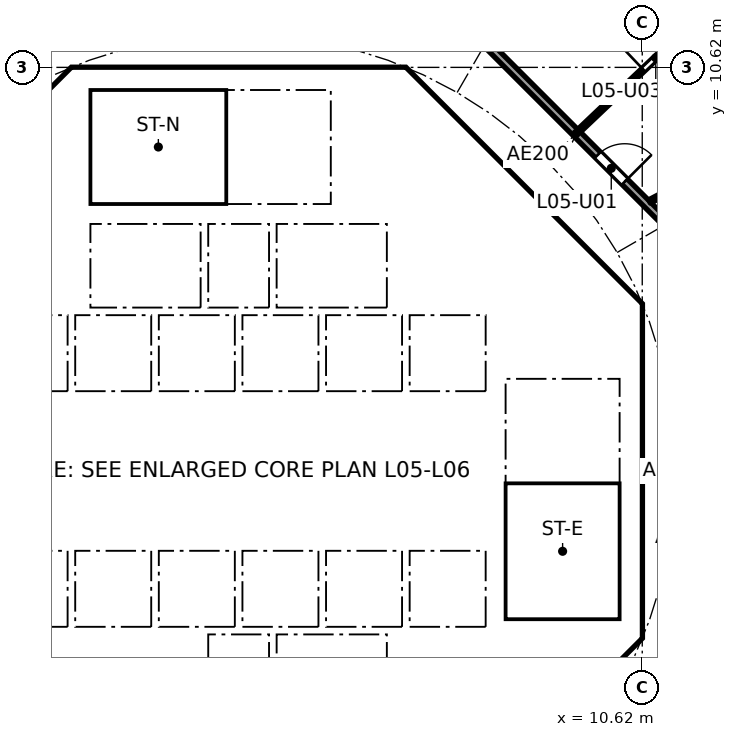
"""IFC4 building model, lengths in metres.
Left out: names, types, materials, properties, quantities, classifications, styles, units other than length and angle.
Written with IfcOpenShell. Run it as: python <this file> out.ifc"""

import sys

from ifc_helpers import new_model, si_unit, direction, frame, frame_2d, origin, place, context, subcontext, project, spatial, polyline, rectangle, outline, extrude, element, fill, save


model = new_model("IFC4")
c1 = context("Model", 3, precision=1e-05, world=origin(), true_north=direction((0.0, 1.0)))
c2 = subcontext(c1, "Body", "Model", "MODEL_VIEW")
j1 = project(units=[si_unit("LENGTHUNIT", "METRE"), si_unit("PLANEANGLEUNIT", "RADIAN")], contexts=[c1])
p1 = place(None, origin())
s1 = spatial("IfcSite", under=j1, at=p1, CompositionType="ELEMENT")
p2 = place(p1, origin())
s2 = spatial("IfcBuilding", under=s1, at=p2, CompositionType="ELEMENT")
p3 = place(p2, frame((0.0, 0.0, 27.0)))
s3 = spatial("IfcBuildingStorey", under=s2, at=p3, CompositionType="ELEMENT", Elevation=27.0)
p4 = place(p3, frame((9.988, 4.613, 0.0), z_axis=(0.0, 0.0, 1.0), x_axis=(-0.707106781187, 0.707106781187, 0.0)))
e1 = element("IfcWall", 1, at=p4, inside=s3, PredefinedType="SHEAR", context=c2, shape_type="SweptSolid", body=[
    extrude(rectangle(XDim=7.602, YDim=0.6, at=frame_2d((3.801, 0.0))), origin(), (0.0, 0.0, 1.0), 3.44),
])
p5 = place(p4, frame((3.201, 0.0, 0.0)))
e2 = element("IfcOpeningElement", 2, at=p5, cuts=e1, PredefinedType="OPENING", context=c2, shape_type="SweptSolid", body=[
    extrude(rectangle(XDim=1.2, YDim=2.1, at=frame_2d((0.6, 1.05))), frame((0.0, 0.31, 0.0), z_axis=(0.0, -1.0, 0.0), x_axis=(1.0, 0.0, 0.0)), (0.0, 0.0, 1.0), 0.62),
])
p6 = place(p3, frame((-4.613, 9.988, 0.0), z_axis=(0.0, 0.0, 1.0), x_axis=(-0.707106781187, -0.707106781187, 0.0)))
e3 = element("IfcWall", 3, at=p6, inside=s3, PredefinedType="SHEAR", context=c2, shape_type="SweptSolid", body=[
    extrude(rectangle(XDim=7.602, YDim=0.6, at=frame_2d((3.801, 0.0))), origin(), (0.0, 0.0, 1.0), 3.44),
])
p7 = place(p6, frame((0.351, 0.0, 0.0)))
e4 = element("IfcOpeningElement", 4, at=p7, cuts=e3, PredefinedType="OPENING", context=c2, shape_type="SweptSolid", body=[
    extrude(rectangle(XDim=1.1, YDim=2.1, at=frame_2d((0.55, 1.05))), frame((0.0, 0.31, 0.0), z_axis=(0.0, -1.0, 0.0), x_axis=(1.0, 0.0, 0.0)), (0.0, 0.0, 1.0), 0.62),
])
p8 = place(p3, frame((-9.988, -4.613, 0.0), z_axis=(0.0, 0.0, 1.0), x_axis=(0.707106781187, -0.707106781187, 0.0)))
e5 = element("IfcWall", 5, at=p8, inside=s3, PredefinedType="SHEAR", context=c2, shape_type="SweptSolid", body=[
    extrude(rectangle(XDim=7.602, YDim=0.6, at=frame_2d((3.801, 0.0))), origin(), (0.0, 0.0, 1.0), 3.44),
])
p9 = place(p8, frame((6.151, 0.0, 0.0)))
e6 = element("IfcOpeningElement", 6, at=p9, cuts=e5, PredefinedType="OPENING", context=c2, shape_type="SweptSolid", body=[
    extrude(rectangle(XDim=1.1, YDim=2.1, at=frame_2d((0.55, 1.05))), frame((0.0, 0.31, 0.0), z_axis=(0.0, -1.0, 0.0), x_axis=(1.0, 0.0, 0.0)), (0.0, 0.0, 1.0), 0.62),
])
p10 = place(p3, frame((4.613, -9.988, 0.0), z_axis=(0.0, 0.0, 1.0), x_axis=(0.707106781187, 0.707106781187, 0.0)))
e7 = element("IfcWall", 7, at=p10, inside=s3, PredefinedType="SHEAR", context=c2, shape_type="SweptSolid", body=[
    extrude(rectangle(XDim=7.602, YDim=0.6, at=frame_2d((3.801, 0.0))), origin(), (0.0, 0.0, 1.0), 3.44),
])
p11 = place(p10, frame((3.201, 0.0, 0.0)))
e8 = element("IfcOpeningElement", 8, at=p11, cuts=e7, PredefinedType="OPENING", context=c2, shape_type="SweptSolid", body=[
    extrude(rectangle(XDim=1.2, YDim=2.1, at=frame_2d((0.6, 1.05))), frame((0.0, 0.31, 0.0), z_axis=(0.0, -1.0, 0.0), x_axis=(1.0, 0.0, 0.0)), (0.0, 0.0, 1.0), 0.62),
])
p12 = place(p3, frame((4.0, 4.3, 0.0), z_axis=(0.0, 0.0, 1.0), x_axis=(0.0, 1.0, 0.0)))
e9 = element("IfcWall", 9, at=p12, inside=s3, PredefinedType="SOLIDWALL", context=c2, shape_type="SweptSolid", body=[
    extrude(rectangle(XDim=2.2, YDim=0.2, at=frame_2d((1.1, 0.0))), origin(), (0.0, 0.0, 1.0), 3.44),
])
p13 = place(p12, frame((0.55, 0.0, 0.0)))
e10 = element("IfcOpeningElement", 10, at=p13, cuts=e9, PredefinedType="OPENING", context=c2, shape_type="SweptSolid", body=[
    extrude(rectangle(XDim=1.1, YDim=2.1, at=frame_2d((0.55, 1.05))), frame((0.0, 0.11, 0.0), z_axis=(0.0, -1.0, 0.0), x_axis=(1.0, 0.0, 0.0)), (0.0, 0.0, 1.0), 0.22),
])
p14 = place(p3, frame((-4.0, 4.3, 0.0), z_axis=(0.0, 0.0, 1.0), x_axis=(0.0, 1.0, 0.0)))
e11 = element("IfcWall", 11, at=p14, inside=s3, PredefinedType="SOLIDWALL", context=c2, shape_type="SweptSolid", body=[
    extrude(rectangle(XDim=2.2, YDim=0.2, at=frame_2d((1.1, 0.0))), origin(), (0.0, 0.0, 1.0), 3.44),
])
p15 = place(p14, frame((0.55, 0.0, 0.0)))
e12 = element("IfcOpeningElement", 12, at=p15, cuts=e11, PredefinedType="OPENING", context=c2, shape_type="SweptSolid", body=[
    extrude(rectangle(XDim=1.1, YDim=2.1, at=frame_2d((0.55, 1.05))), frame((0.0, 0.11, 0.0), z_axis=(0.0, -1.0, 0.0), x_axis=(1.0, 0.0, 0.0)), (0.0, 0.0, 1.0), 0.22),
])
p16 = place(p3, frame((-6.7, 2.0, 0.0), z_axis=(0.0, 0.0, 1.0), x_axis=(1.0, 0.0, 0.0)))
e13 = element("IfcWall", 13, at=p16, inside=s3, PredefinedType="SOLIDWALL", context=c2, shape_type="SweptSolid", body=[
    extrude(rectangle(XDim=13.4, YDim=0.2, at=frame_2d((6.7, 0.0))), origin(), (0.0, 0.0, 1.0), 3.44),
])
p17 = place(p16, frame((0.65, 0.0, 0.0)))
e14 = element("IfcOpeningElement", 14, at=p17, cuts=e13, PredefinedType="OPENING", context=c2, shape_type="SweptSolid", body=[
    extrude(rectangle(XDim=1.1, YDim=2.1, at=frame_2d((0.55, 1.05))), frame((0.0, 0.11, 0.0), z_axis=(0.0, -1.0, 0.0), x_axis=(1.0, 0.0, 0.0)), (0.0, 0.0, 1.0), 0.22),
])
p18 = place(p16, frame((2.85, 0.0, 0.0)))
e15 = element("IfcOpeningElement", 15, at=p18, cuts=e13, PredefinedType="OPENING", context=c2, shape_type="SweptSolid", body=[
    extrude(rectangle(XDim=1.1, YDim=2.1, at=frame_2d((0.55, 1.05))), frame((0.0, 0.11, 0.0), z_axis=(0.0, -1.0, 0.0), x_axis=(1.0, 0.0, 0.0)), (0.0, 0.0, 1.0), 0.22),
])
p19 = place(p16, frame((5.05, 0.0, 0.0)))
e16 = element("IfcOpeningElement", 16, at=p19, cuts=e13, PredefinedType="OPENING", context=c2, shape_type="SweptSolid", body=[
    extrude(rectangle(XDim=1.1, YDim=2.1, at=frame_2d((0.55, 1.05))), frame((0.0, 0.11, 0.0), z_axis=(0.0, -1.0, 0.0), x_axis=(1.0, 0.0, 0.0)), (0.0, 0.0, 1.0), 0.22),
])
p20 = place(p3, frame((6.7, 4.0, 0.0), z_axis=(0.0, 0.0, 1.0), x_axis=(1.0, 0.0, 0.0)))
e17 = element("IfcWall", 17, at=p20, inside=s3, PredefinedType="SOLIDWALL", context=c2, shape_type="SweptSolid", body=[
    extrude(rectangle(XDim=3.325, YDim=0.2, at=frame_2d((1.662, 0.0))), origin(), (0.0, 0.0, 1.0), 3.44),
])
p21 = place(p20, frame((1.25, 0.0, 0.0)))
e18 = element("IfcOpeningElement", 18, at=p21, cuts=e17, PredefinedType="OPENING", context=c2, shape_type="SweptSolid", body=[
    extrude(rectangle(XDim=1.1, YDim=2.1, at=frame_2d((0.55, 1.05))), frame((0.0, 0.11, 0.0), z_axis=(0.0, -1.0, 0.0), x_axis=(1.0, 0.0, 0.0)), (0.0, 0.0, 1.0), 0.22),
])
p22 = place(p3, frame((4.0, 7.025, 0.0), z_axis=(0.0, 0.0, 1.0), x_axis=(0.0, 1.0, 0.0)))
e19 = element("IfcWall", 19, at=p22, inside=s3, PredefinedType="SOLIDWALL", context=c2, shape_type="SweptSolid", body=[
    extrude(rectangle(XDim=3.0, YDim=0.2, at=frame_2d((1.5, 0.0))), origin(), (0.0, 0.0, 1.0), 3.44),
])
p23 = place(p22, frame((0.925, 0.0, 0.0)))
e20 = element("IfcOpeningElement", 20, at=p23, cuts=e19, PredefinedType="OPENING", context=c2, shape_type="SweptSolid", body=[
    extrude(rectangle(XDim=1.1, YDim=2.1, at=frame_2d((0.55, 1.05))), frame((0.0, 0.11, 0.0), z_axis=(0.0, -1.0, 0.0), x_axis=(1.0, 0.0, 0.0)), (0.0, 0.0, 1.0), 0.22),
])
p24 = place(p3, frame((4.0, -6.5, 0.0), z_axis=(0.0, 0.0, 1.0), x_axis=(0.0, 1.0, 0.0)))
e21 = element("IfcWall", 21, at=p24, inside=s3, PredefinedType="SOLIDWALL", context=c2, shape_type="SweptSolid", body=[
    extrude(rectangle(XDim=2.2, YDim=0.2, at=frame_2d((1.1, 0.0))), origin(), (0.0, 0.0, 1.0), 3.44),
])
p25 = place(p24, frame((0.55, 0.0, 0.0)))
e22 = element("IfcOpeningElement", 22, at=p25, cuts=e21, PredefinedType="OPENING", context=c2, shape_type="SweptSolid", body=[
    extrude(rectangle(XDim=1.1, YDim=2.1, at=frame_2d((0.55, 1.05))), frame((0.0, 0.11, 0.0), z_axis=(0.0, -1.0, 0.0), x_axis=(1.0, 0.0, 0.0)), (0.0, 0.0, 1.0), 0.22),
])
p26 = place(p3, frame((-4.0, -6.5, 0.0), z_axis=(0.0, 0.0, 1.0), x_axis=(0.0, 1.0, 0.0)))
e23 = element("IfcWall", 23, at=p26, inside=s3, PredefinedType="SOLIDWALL", context=c2, shape_type="SweptSolid", body=[
    extrude(rectangle(XDim=2.2, YDim=0.2, at=frame_2d((1.1, 0.0))), origin(), (0.0, 0.0, 1.0), 3.44),
])
p27 = place(p26, frame((0.65, 0.0, 0.0)))
e24 = element("IfcOpeningElement", 24, at=p27, cuts=e23, PredefinedType="OPENING", context=c2, shape_type="SweptSolid", body=[
    extrude(rectangle(XDim=0.9, YDim=2.1, at=frame_2d((0.45, 1.05))), frame((0.0, 0.11, 0.0), z_axis=(0.0, -1.0, 0.0), x_axis=(1.0, 0.0, 0.0)), (0.0, 0.0, 1.0), 0.22),
])
p28 = place(p3, frame((-6.7, -2.0, 0.0), z_axis=(0.0, 0.0, 1.0), x_axis=(1.0, 0.0, 0.0)))
e25 = element("IfcWall", 25, at=p28, inside=s3, PredefinedType="SOLIDWALL", context=c2, shape_type="SweptSolid", body=[
    extrude(rectangle(XDim=13.4, YDim=0.2, at=frame_2d((6.7, 0.0))), origin(), (0.0, 0.0, 1.0), 3.44),
])
p29 = place(p28, frame((0.65, 0.0, 0.0)))
e26 = element("IfcOpeningElement", 26, at=p29, cuts=e25, PredefinedType="OPENING", context=c2, shape_type="SweptSolid", body=[
    extrude(rectangle(XDim=1.1, YDim=2.1, at=frame_2d((0.55, 1.05))), frame((0.0, 0.11, 0.0), z_axis=(0.0, -1.0, 0.0), x_axis=(1.0, 0.0, 0.0)), (0.0, 0.0, 1.0), 0.22),
])
p30 = place(p28, frame((2.85, 0.0, 0.0)))
e27 = element("IfcOpeningElement", 27, at=p30, cuts=e25, PredefinedType="OPENING", context=c2, shape_type="SweptSolid", body=[
    extrude(rectangle(XDim=1.1, YDim=2.1, at=frame_2d((0.55, 1.05))), frame((0.0, 0.11, 0.0), z_axis=(0.0, -1.0, 0.0), x_axis=(1.0, 0.0, 0.0)), (0.0, 0.0, 1.0), 0.22),
])
p31 = place(p3, origin())
e28 = element("IfcWall", 28, at=p31, inside=s3, PredefinedType="SHEAR", context=c2, shape_type="SweptSolid", body=[
    extrude(outline(polyline([(-4.152, 10.025), (-4.401, 9.776), (-4.825, 10.2), (-4.401, 10.625), (4.401, 10.625), (4.825, 10.2), (4.401, 9.776), (4.152, 10.025), (-4.152, 10.025)])), origin(), (0.0, 0.0, 1.0), 3.44),
])
p32 = place(p3, origin())
e29 = element("IfcWall", 29, at=p32, inside=s3, PredefinedType="SHEAR", context=c2, shape_type="SweptSolid", body=[
    extrude(outline(polyline([(9.776, -4.401), (10.025, -4.152), (10.025, -3.801), (10.025, 4.152), (9.776, 4.401), (10.2, 4.825), (10.625, 4.401), (10.625, -4.401), (10.2, -4.825), (9.776, -4.401)])), origin(), (0.0, 0.0, 1.0), 3.44),
])
for number, where, z_axis, x_axis in (
    (30, (-0.9, -6.5, 0.0), (0.0, 0.0, 1.0), (0.0, 1.0, 0.0)),
    (31, (0.9, -6.5, 0.0), (0.0, 0.0, 1.0), (0.0, 1.0, 0.0)),
):
    element("IfcWall", number, at=place(p3, frame(where, z_axis=z_axis, x_axis=x_axis)), inside=s3, PredefinedType="SOLIDWALL", context=c2, shape_type="SweptSolid", body=[
        extrude(rectangle(XDim=2.2, YDim=0.2, at=frame_2d((1.1, 0.0))), origin(), (0.0, 0.0, 1.0), 3.44),
    ])
p33 = place(p3, origin())
e32 = element("IfcWall", 32, at=p33, inside=s3, PredefinedType="SOLIDWALL", context=c2, shape_type="SweptSolid", body=[
    extrude(outline(polyline([(-6.7, -2.1), (-6.5, -2.1), (-6.5, -4.1), (-4.5, -4.1), (-4.5, -2.1), (-4.3, -2.1), (-4.3, -4.1), (-2.3, -4.1), (-2.3, -2.1), (-2.1, -2.1), (-2.1, -4.1), (-0.1, -4.1), (-0.1, -2.1), (0.1, -2.1), (0.1, -4.1), (2.1, -4.1), (2.1, -2.1), (2.3, -2.1), (2.3, -4.1), (4.3, -4.1), (4.3, -2.1), (4.5, -2.1), (4.5, -4.1), (6.5, -4.1), (6.5, -2.1), (6.7, -2.1), (6.7, -4.3), (-6.7, -4.3), (-6.7, -2.1)])), origin(), (0.0, 0.0, 1.0), 3.44),
])
for number, where, z_axis, x_axis in (
    (33, (-0.9, 4.3, 0.0), (0.0, 0.0, 1.0), (0.0, 1.0, 0.0)),
    (34, (0.9, 4.3, 0.0), (0.0, 0.0, 1.0), (0.0, 1.0, 0.0)),
):
    element("IfcWall", number, at=place(p3, frame(where, z_axis=z_axis, x_axis=x_axis)), inside=s3, PredefinedType="SOLIDWALL", context=c2, shape_type="SweptSolid", body=[
        extrude(rectangle(XDim=2.2, YDim=0.2, at=frame_2d((1.1, 0.0))), origin(), (0.0, 0.0, 1.0), 3.44),
    ])
p34 = place(p3, origin())
e35 = element("IfcWall", 35, at=p34, inside=s3, PredefinedType="SOLIDWALL", context=c2, shape_type="SweptSolid", body=[
    extrude(outline(polyline([(-6.5, 2.1), (-6.7, 2.1), (-6.7, 4.3), (6.7, 4.3), (6.7, 2.1), (6.5, 2.1), (6.5, 4.1), (4.5, 4.1), (4.5, 2.1), (4.3, 2.1), (4.3, 4.1), (2.3, 4.1), (2.3, 2.1), (2.1, 2.1), (2.1, 4.1), (0.1, 4.1), (0.1, 2.1), (-0.1, 2.1), (-0.1, 4.1), (-2.1, 4.1), (-2.1, 2.1), (-2.3, 2.1), (-2.3, 4.1), (-4.3, 4.1), (-4.3, 2.1), (-4.5, 2.1), (-4.5, 4.1), (-6.5, 4.1), (-6.5, 2.1)])), origin(), (0.0, 0.0, 1.0), 3.44),
])
p35 = place(p3, origin())
e36 = element("IfcWall", 36, at=p35, inside=s3, PredefinedType="SOLIDWALL", context=c2, shape_type="SweptSolid", body=[
    extrude(outline(polyline([(-3.9, 7.025), (-4.1, 7.025), (-4.1, 10.025), (-3.9, 10.025), (-3.9, 7.025)])), origin(), (0.0, 0.0, 1.0), 3.44),
])
p36 = place(p3, origin())
e37 = element("IfcWall", 37, at=p36, inside=s3, PredefinedType="SOLIDWALL", context=c2, shape_type="SweptSolid", body=[
    extrude(outline(polyline([(4.1, 6.5), (-4.1, 6.5), (-4.1, 7.025), (4.1, 7.025), (4.1, 6.5)])), origin(), (0.0, 0.0, 1.0), 3.44),
])
p37 = place(p3, origin())
e38 = element("IfcWall", 38, at=p37, inside=s3, PredefinedType="SOLIDWALL", context=c2, shape_type="SweptSolid", body=[
    extrude(outline(polyline([(7.025, -3.9), (6.7, -3.9), (6.7, 3.9), (7.025, 3.9), (7.025, -3.9)])), origin(), (0.0, 0.0, 1.0), 3.44),
])
p38 = place(p3, origin())
e39 = element("IfcWall", 39, at=p38, inside=s3, PredefinedType="SOLIDWALL", context=c2, shape_type="SweptSolid", body=[
    extrude(outline(polyline([(10.025, -4.1), (6.7, -4.1), (6.7, -3.9), (10.025, -3.9), (10.025, -4.1)])), origin(), (0.0, 0.0, 1.0), 3.44),
])
p39 = place(p3, frame((12.635, 5.134, 0.0), z_axis=(0.0, 0.0, 1.0), x_axis=(-0.707106781187, 0.707106781187, 0.0)))
e40 = element("IfcWall", 40, at=p39, inside=s3, PredefinedType="PARTITIONING", context=c2, shape_type="SweptSolid", body=[
    extrude(rectangle(XDim=10.609, YDim=0.2, at=frame_2d((5.305, 0.0))), origin(), (0.0, 0.0, 1.0), 3.44),
])
p40 = place(p39, frame((3.503, 0.0, 0.0)))
e41 = element("IfcOpeningElement", 41, at=p40, cuts=e40, PredefinedType="OPENING", context=c2, shape_type="SweptSolid", body=[
    extrude(rectangle(XDim=1.0, YDim=2.1, at=frame_2d((0.5, 1.05))), frame((0.0, 0.11, 0.0), z_axis=(0.0, -1.0, 0.0), x_axis=(1.0, 0.0, 0.0)), (0.0, 0.0, 1.0), 0.22),
])
p41 = place(p3, frame((10.813, 7.091, 0.0), z_axis=(0.0, 0.0, 1.0), x_axis=(0.885182649479, 0.465243674928, 0.0)))
e42 = element("IfcWall", 42, at=p41, inside=s3, PredefinedType="PARTITIONING", context=c2, shape_type="SweptSolid", body=[
    extrude(rectangle(XDim=12.551, YDim=0.1, at=frame_2d((6.275, 0.0))), origin(), (0.0, 0.0, 1.0), 2.687),
])
p42 = place(p41, frame((0.539, 0.0, 0.0)))
e43 = element("IfcOpeningElement", 43, at=p42, cuts=e42, PredefinedType="OPENING", context=c2, shape_type="SweptSolid", body=[
    extrude(rectangle(XDim=0.9, YDim=2.1, at=frame_2d((0.45, 1.05))), frame((0.0, 0.06, 0.0), z_axis=(0.0, -1.0, 0.0), x_axis=(1.0, 0.0, 0.0)), (0.0, 0.0, 1.0), 0.12),
])
p43 = place(p41, frame((8.494, 0.0, 0.0)))
e44 = element("IfcOpeningElement", 44, at=p43, cuts=e42, PredefinedType="OPENING", context=c2, shape_type="SweptSolid", body=[
    extrude(rectangle(XDim=0.9, YDim=2.1, at=frame_2d((0.45, 1.05))), frame((0.0, 0.06, 0.0), z_axis=(0.0, -1.0, 0.0), x_axis=(1.0, 0.0, 0.0)), (0.0, 0.0, 1.0), 0.12),
])
p44 = place(p3, frame((8.957, 8.953, 0.0), z_axis=(0.0, 0.0, 1.0), x_axis=(0.725250022034, 0.688485588476, 0.0)))
e45 = element("IfcWall", 45, at=p44, inside=s3, PredefinedType="PARTITIONING", context=c2, shape_type="SweptSolid", body=[
    extrude(rectangle(XDim=12.963, YDim=0.1, at=frame_2d((6.481, 0.0))), origin(), (0.0, 0.0, 1.0), 2.687),
])
p45 = place(p44, frame((2.333, 0.0, 0.0)))
e46 = element("IfcOpeningElement", 46, at=p45, cuts=e45, PredefinedType="OPENING", context=c2, shape_type="SweptSolid", body=[
    extrude(rectangle(XDim=0.9, YDim=2.1, at=frame_2d((0.45, 1.05))), frame((0.0, 0.06, 0.0), z_axis=(0.0, -1.0, 0.0), x_axis=(1.0, 0.0, 0.0)), (0.0, 0.0, 1.0), 0.12),
])
p46 = place(p44, frame((8.79, 0.0, 0.0)))
e47 = element("IfcOpeningElement", 47, at=p46, cuts=e45, PredefinedType="OPENING", context=c2, shape_type="SweptSolid", body=[
    extrude(rectangle(XDim=0.9, YDim=2.1, at=frame_2d((0.45, 1.05))), frame((0.0, 0.06, 0.0), z_axis=(0.0, -1.0, 0.0), x_axis=(1.0, 0.0, 0.0)), (0.0, 0.0, 1.0), 0.12),
])
p47 = place(p18, origin())
e48 = element("IfcDoor", 48, at=p47, inside=s3, OperationType="DOUBLE_DOOR_SLIDING", PredefinedType="DOOR", context=c2, shape_type="SweptSolid", body=[
    extrude(rectangle(XDim=1.1, YDim=2.1, at=frame_2d((0.55, 1.05))), frame((0.0, 0.025, 0.0), z_axis=(0.0, -1.0, 0.0), x_axis=(1.0, 0.0, 0.0)), (0.0, 0.0, 1.0), 0.05),
])
fill(e15, e48)
p48 = place(p19, origin())
e49 = element("IfcDoor", 49, at=p48, inside=s3, OperationType="DOUBLE_DOOR_SLIDING", PredefinedType="DOOR", context=c2, shape_type="SweptSolid", body=[
    extrude(rectangle(XDim=1.1, YDim=2.1, at=frame_2d((0.55, 1.05))), frame((0.0, 0.025, 0.0), z_axis=(0.0, -1.0, 0.0), x_axis=(1.0, 0.0, 0.0)), (0.0, 0.0, 1.0), 0.05),
])
fill(e16, e49)
p49 = place(p30, origin())
e50 = element("IfcDoor", 50, at=p49, inside=s3, OperationType="DOUBLE_DOOR_SLIDING", PredefinedType="DOOR", context=c2, shape_type="SweptSolid", body=[
    extrude(rectangle(XDim=1.1, YDim=2.1, at=frame_2d((0.55, 1.05))), frame((0.0, 0.025, 0.0), z_axis=(0.0, -1.0, 0.0), x_axis=(1.0, 0.0, 0.0)), (0.0, 0.0, 1.0), 0.05),
])
fill(e27, e50)
p50 = place(p13, origin())
e51 = element("IfcDoor", 51, at=p50, inside=s3, OperationType="DOUBLE_DOOR_SLIDING", PredefinedType="DOOR", context=c2, shape_type="SweptSolid", body=[
    extrude(rectangle(XDim=1.1, YDim=2.1, at=frame_2d((0.55, 1.05))), frame((0.0, 0.025, 0.0), z_axis=(0.0, -1.0, 0.0), x_axis=(1.0, 0.0, 0.0)), (0.0, 0.0, 1.0), 0.05),
])
fill(e10, e51)
p51 = place(p25, origin())
e52 = element("IfcDoor", 52, at=p51, inside=s3, OperationType="DOUBLE_DOOR_SLIDING", PredefinedType="DOOR", context=c2, shape_type="SweptSolid", body=[
    extrude(rectangle(XDim=1.1, YDim=2.1, at=frame_2d((0.55, 1.05))), frame((0.0, 0.025, 0.0), z_axis=(0.0, -1.0, 0.0), x_axis=(1.0, 0.0, 0.0)), (0.0, 0.0, 1.0), 0.05),
])
fill(e22, e52)
p52 = place(p15, origin())
e53 = element("IfcDoor", 53, at=p52, inside=s3, OperationType="DOUBLE_DOOR_SLIDING", PredefinedType="DOOR", context=c2, shape_type="SweptSolid", body=[
    extrude(rectangle(XDim=1.1, YDim=2.1, at=frame_2d((0.55, 1.05))), frame((0.0, 0.025, 0.0), z_axis=(0.0, -1.0, 0.0), x_axis=(1.0, 0.0, 0.0)), (0.0, 0.0, 1.0), 0.05),
])
fill(e12, e53)
p53 = place(p21, frame((1.1, 0.0, 0.0), x_axis=(-1.0, 0.0, 0.0)))
e54 = element("IfcDoor", 54, at=p53, inside=s3, OperationType="SINGLE_SWING_LEFT", PredefinedType="DOOR", context=c2, shape_type="SweptSolid", body=[
    extrude(rectangle(XDim=1.1, YDim=2.1, at=frame_2d((0.55, 1.05))), frame((0.0, 0.025, 0.0), z_axis=(0.0, -1.0, 0.0), x_axis=(1.0, 0.0, 0.0)), (0.0, 0.0, 1.0), 0.05),
])
fill(e18, e54)
p54 = place(p23, origin())
e55 = element("IfcDoor", 55, at=p54, inside=s3, OperationType="SINGLE_SWING_RIGHT", PredefinedType="DOOR", context=c2, shape_type="SweptSolid", body=[
    extrude(rectangle(XDim=1.1, YDim=2.1, at=frame_2d((0.55, 1.05))), frame((0.0, 0.025, 0.0), z_axis=(0.0, -1.0, 0.0), x_axis=(1.0, 0.0, 0.0)), (0.0, 0.0, 1.0), 0.05),
])
fill(e20, e55)
p55 = place(p5, origin())
e56 = element("IfcDoor", 56, at=p55, inside=s3, OperationType="SINGLE_SWING_LEFT", PredefinedType="DOOR", context=c2, shape_type="SweptSolid", body=[
    extrude(rectangle(XDim=1.2, YDim=2.1, at=frame_2d((0.6, 1.05))), frame((0.0, 0.025, 0.0), z_axis=(0.0, -1.0, 0.0), x_axis=(1.0, 0.0, 0.0)), (0.0, 0.0, 1.0), 0.05),
])
fill(e2, e56)
p56 = place(p7, origin())
e57 = element("IfcDoor", 57, at=p56, inside=s3, OperationType="SINGLE_SWING_LEFT", PredefinedType="DOOR", context=c2, shape_type="SweptSolid", body=[
    extrude(rectangle(XDim=1.1, YDim=2.1, at=frame_2d((0.55, 1.05))), frame((0.0, 0.025, 0.0), z_axis=(0.0, -1.0, 0.0), x_axis=(1.0, 0.0, 0.0)), (0.0, 0.0, 1.0), 0.05),
])
fill(e4, e57)
p57 = place(p40, frame((1.0, 0.0, 0.0), x_axis=(-1.0, 0.0, 0.0)))
e58 = element("IfcDoor", 58, at=p57, inside=s3, OperationType="SINGLE_SWING_RIGHT", PredefinedType="DOOR", context=c2, shape_type="SweptSolid", body=[
    extrude(rectangle(XDim=1.0, YDim=2.1, at=frame_2d((0.5, 1.05))), frame((0.0, 0.025, 0.0), z_axis=(0.0, -1.0, 0.0), x_axis=(1.0, 0.0, 0.0)), (0.0, 0.0, 1.0), 0.05),
])
fill(e41, e58)
p58 = place(p45, origin())
e59 = element("IfcDoor", 59, at=p58, inside=s3, OperationType="SINGLE_SWING_LEFT", PredefinedType="DOOR", context=c2, shape_type="SweptSolid", body=[
    extrude(rectangle(XDim=0.9, YDim=2.1, at=frame_2d((0.45, 1.05))), frame((0.0, 0.025, 0.0), z_axis=(0.0, -1.0, 0.0), x_axis=(1.0, 0.0, 0.0)), (0.0, 0.0, 1.0), 0.05),
])
fill(e46, e59)
save(model, sys.argv[1])
